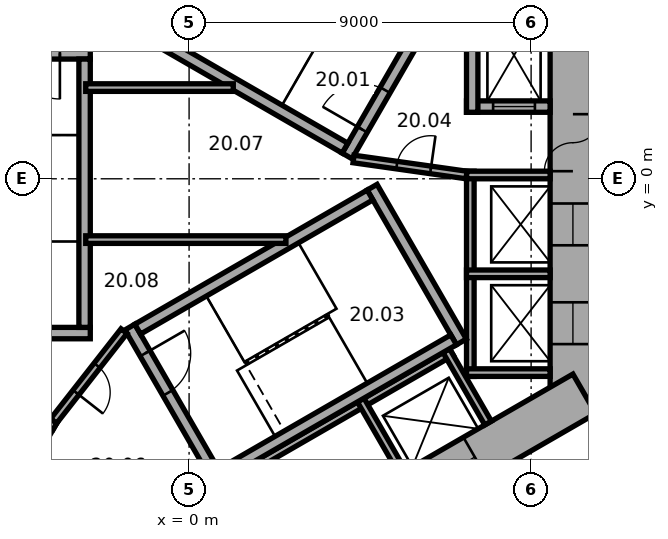
"""IFC4 building model, lengths in metres.
Left out: names, types, materials, properties, quantities, classifications, styles, units other than length and angle.
Written with IfcOpenShell. Run it as: python <this file> out.ifc"""

import sys

from ifc_helpers import new_model, si_unit, direction, frame, frame_2d, origin, place, context, subcontext, project, spatial, rectangle, extrude, element, fill, save


model = new_model("IFC4")
c1 = context("Model", 3, precision=1e-05, world=origin(), true_north=direction((0.0, 1.0)))
c2 = subcontext(c1, "Body", "Model", "MODEL_VIEW")
j1 = project(units=[si_unit("LENGTHUNIT", "METRE"), si_unit("PLANEANGLEUNIT", "RADIAN")], contexts=[c1])
p1 = place(None, origin())
s1 = spatial("IfcSite", under=j1, at=p1, CompositionType="ELEMENT")
p2 = place(p1, origin())
s2 = spatial("IfcBuilding", under=s1, at=p2, CompositionType="ELEMENT")
p3 = place(p2, frame((0.0, 0.0, 90.2)))
s3 = spatial("IfcBuildingStorey", under=s2, at=p3, CompositionType="ELEMENT", Elevation=90.2)
p4 = place(p3, frame((10.1, -6.177, 0.0), z_axis=(0.0, 0.0, 1.0), x_axis=(0.0, 1.0, 0.0)))
e1 = element("IfcWall", 1, at=p4, inside=s3, PredefinedType="SHEAR", context=c2, shape_type="SweptSolid", body=[
    extrude(rectangle(XDim=12.355, YDim=1.2, at=frame_2d((6.177, 0.0))), origin(), (0.0, 0.0, 1.0), 3.3),
])
p5 = place(p4, frame((6.378, 0.0, 0.0)))
e2 = element("IfcOpeningElement", 2, at=p5, cuts=e1, PredefinedType="OPENING", context=c2, shape_type="SweptSolid", body=[
    extrude(rectangle(XDim=1.5, YDim=2.1, at=frame_2d((0.75, 1.05))), frame((0.0, 0.61, 0.0), z_axis=(0.0, -1.0, 0.0), x_axis=(1.0, 0.0, 0.0)), (0.0, 0.0, 1.0), 1.22),
])
p6 = place(p4, frame((1.828, 0.0, 0.0)))
e3 = element("IfcOpeningElement", 3, at=p6, cuts=e1, PredefinedType="OPENING", context=c2, shape_type="SweptSolid", body=[
    extrude(rectangle(XDim=1.1, YDim=2.1, at=frame_2d((0.55, 1.05))), frame((0.0, 0.61, 0.0), z_axis=(0.0, -1.0, 0.0), x_axis=(1.0, 0.0, 0.0)), (0.0, 0.0, 1.0), 1.22),
])
p7 = place(p4, frame((4.427, 0.0, 0.0)))
e4 = element("IfcOpeningElement", 4, at=p7, cuts=e1, PredefinedType="OPENING", context=c2, shape_type="SweptSolid", body=[
    extrude(rectangle(XDim=1.1, YDim=2.1, at=frame_2d((0.55, 1.05))), frame((0.0, 0.61, 0.0), z_axis=(0.0, -1.0, 0.0), x_axis=(1.0, 0.0, 0.0)), (0.0, 0.0, 1.0), 1.22),
])
p8 = place(p3, frame((-10.4, -5.658, 0.0), z_axis=(0.0, 0.0, 1.0), x_axis=(0.866021384402, -0.500006961711, 0.0)))
e5 = element("IfcWall", 5, at=p8, inside=s3, PredefinedType="SHEAR", context=c2, shape_type="SweptSolid", body=[
    extrude(rectangle(XDim=12.355, YDim=1.2, at=frame_2d((6.178, 0.0))), origin(), (0.0, 0.0, 1.0), 3.3),
])
p9 = place(p8, frame((6.378, 0.0, 0.0)))
e6 = element("IfcOpeningElement", 6, at=p9, cuts=e5, PredefinedType="OPENING", context=c2, shape_type="SweptSolid", body=[
    extrude(rectangle(XDim=1.5, YDim=2.1, at=frame_2d((0.75, 1.05))), frame((0.0, 0.61, 0.0), z_axis=(0.0, -1.0, 0.0), x_axis=(1.0, 0.0, 0.0)), (0.0, 0.0, 1.0), 1.22),
])
p10 = place(p8, frame((3.228, 0.0, 0.0)))
e7 = element("IfcOpeningElement", 7, at=p10, cuts=e5, PredefinedType="OPENING", context=c2, shape_type="SweptSolid", body=[
    extrude(rectangle(XDim=0.9, YDim=2.1, at=frame_2d((0.45, 1.05))), frame((0.0, 0.61, 0.0), z_axis=(0.0, -1.0, 0.0), x_axis=(1.0, 0.0, 0.0)), (0.0, 0.0, 1.0), 1.22),
])
p11 = place(p3, frame((-0.3, -11.836, 0.0), z_axis=(0.0, 0.0, 1.0), x_axis=(0.866021384402, 0.500006961711, 0.0)))
e8 = element("IfcWall", 8, at=p11, inside=s3, PredefinedType="SHEAR", context=c2, shape_type="SweptSolid", body=[
    extrude(rectangle(XDim=12.355, YDim=1.2, at=frame_2d((6.178, 0.0))), origin(), (0.0, 0.0, 1.0), 3.3),
])
p12 = place(p11, frame((4.128, 0.0, 0.0)))
e9 = element("IfcOpeningElement", 9, at=p12, cuts=e8, PredefinedType="OPENING", context=c2, shape_type="SweptSolid", body=[
    extrude(rectangle(XDim=0.9, YDim=2.1, at=frame_2d((0.45, 1.05))), frame((0.0, 0.61, 0.0), z_axis=(0.0, -1.0, 0.0), x_axis=(1.0, 0.0, 0.0)), (0.0, 0.0, 1.0), 1.22),
])
p13 = place(p11, frame((7.928, 0.0, 0.0)))
e10 = element("IfcOpeningElement", 10, at=p13, cuts=e8, PredefinedType="OPENING", context=c2, shape_type="SweptSolid", body=[
    extrude(rectangle(XDim=1.1, YDim=2.1, at=frame_2d((0.55, 1.05))), frame((0.0, 0.61, 0.0), z_axis=(0.0, -1.0, 0.0), x_axis=(1.0, 0.0, 0.0)), (0.0, 0.0, 1.0), 1.22),
])
p14 = place(p3, frame((7.4, -5.2, 0.0), z_axis=(0.0, 0.0, 1.0), x_axis=(0.0, 1.0, 0.0)))
e11 = element("IfcWall", 11, at=p14, inside=s3, PredefinedType="PARTITIONING", context=c2, shape_type="SweptSolid", body=[
    extrude(rectangle(XDim=5.4, YDim=0.2, at=frame_2d((2.7, 0.0))), origin(), (0.0, 0.0, 1.0), 3.05),
])
for number, where, z_axis, x_axis in (
    (12, (7.3, -5.1, 0.0), (0.0, 0.0, 1.0), (1.0, 0.0, 0.0)),
    (13, (7.3, -2.5, 0.0), (0.0, 0.0, 1.0), (1.0, 0.0, 0.0)),
    (14, (7.3, 0.1, 0.0), (0.0, 0.0, 1.0), (1.0, 0.0, 0.0)),
):
    element("IfcWall", number, at=place(p3, frame(where, z_axis=z_axis, x_axis=x_axis)), inside=s3, PredefinedType="PARTITIONING", context=c2, shape_type="SweptSolid", body=[
        extrude(rectangle(XDim=2.2, YDim=0.2, at=frame_2d((1.1, 0.0))), origin(), (0.0, 0.0, 1.0), 3.05),
    ])
p15 = place(p3, frame((-8.203, -3.809, 0.0), z_axis=(0.0, 0.0, 1.0), x_axis=(0.866028230842, -0.499995103361, 0.0)))
e15 = element("IfcWall", 15, at=p15, inside=s3, PredefinedType="PARTITIONING", context=c2, shape_type="SweptSolid", body=[
    extrude(rectangle(XDim=5.4, YDim=0.2, at=frame_2d((2.7, 0.0))), origin(), (0.0, 0.0, 1.0), 3.05),
])
p16 = place(p3, frame((-3.563, -6.372, 0.0), z_axis=(0.0, 0.0, 1.0), x_axis=(-0.499994660107, -0.866028486751, 0.0)))
e16 = element("IfcWall", 16, at=p16, inside=s3, PredefinedType="PARTITIONING", context=c2, shape_type="SweptSolid", body=[
    extrude(rectangle(XDim=2.2, YDim=0.2, at=frame_2d((1.1, 0.0))), origin(), (0.0, 0.0, 1.0), 3.05),
])
p17 = place(p3, frame((-0.024, -8.559, 0.0), z_axis=(0.0, 0.0, 1.0), x_axis=(0.866026010844, 0.49999894854, 0.0)))
e17 = element("IfcWall", 17, at=p17, inside=s3, PredefinedType="PARTITIONING", context=c2, shape_type="SweptSolid", body=[
    extrude(rectangle(XDim=8.0, YDim=0.2, at=frame_2d((4.0, 0.0))), origin(), (0.0, 0.0, 1.0), 3.05),
])
for number, where, z_axis, x_axis in (
    (18, (4.516, -5.822, 0.0), (0.0, 0.0, 1.0), (0.5, -0.866, 0.0)),
    (19, (6.768, -4.522, 0.0), (0.0, 0.0, 1.0), (0.5, -0.866, 0.0)),
):
    element("IfcWall", number, at=place(p3, frame(where, z_axis=z_axis, x_axis=x_axis)), inside=s3, PredefinedType="PARTITIONING", context=c2, shape_type="SweptSolid", body=[
        extrude(rectangle(XDim=2.2, YDim=0.2, at=frame_2d((1.1, 0.0))), origin(), (0.0, 0.0, 1.0), 3.05),
    ])
p18 = place(p3, frame((4.158, 0.602, 0.0), z_axis=(0.0, 0.0, 1.0), x_axis=(0.499977259774, 0.866038532462, 0.0)))
e20 = element("IfcWall", 20, at=p18, inside=s3, PredefinedType="SHEAR", context=c2, shape_type="SweptSolid", body=[
    extrude(rectangle(XDim=4.7, YDim=0.3, at=frame_2d((2.35, 0.0))), origin(), (0.0, 0.0, 1.0), 3.05),
])
p19 = place(p18, frame((0.8, 0.0, 0.0)))
e21 = element("IfcOpeningElement", 21, at=p19, cuts=e20, PredefinedType="OPENING", context=c2, shape_type="SweptSolid", body=[
    extrude(rectangle(XDim=1.2, YDim=2.1, at=frame_2d((0.6, 1.05))), frame((0.0, 0.16, 0.0), z_axis=(0.0, -1.0, 0.0), x_axis=(1.0, 0.0, 0.0)), (0.0, 0.0, 1.0), 0.32),
])
p20 = place(p3, frame((4.103, 0.807, 0.0), z_axis=(0.0, 0.0, 1.0), x_axis=(-0.866027801685, 0.499995846692, 0.0)))
e22 = element("IfcWall", 22, at=p20, inside=s3, PredefinedType="SHEAR", context=c2, shape_type="SweptSolid", body=[
    extrude(rectangle(XDim=7.06, YDim=0.3, at=frame_2d((3.53, 0.0))), origin(), (0.0, 0.0, 1.0), 3.05),
])
p21 = place(p3, frame((-2.6, 3.3, 0.0), z_axis=(0.0, 0.0, 1.0), x_axis=(-1.0, 0.0, 0.0)))
e23 = element("IfcWall", 23, at=p21, inside=s3, PredefinedType="SHEAR", context=c2, shape_type="SweptSolid", body=[
    extrude(rectangle(XDim=4.7, YDim=0.3, at=frame_2d((2.35, 0.0))), origin(), (0.0, 0.0, 1.0), 3.05),
])
p22 = place(p21, frame((0.8, 0.0, 0.0)))
e24 = element("IfcOpeningElement", 24, at=p22, cuts=e23, PredefinedType="OPENING", context=c2, shape_type="SweptSolid", body=[
    extrude(rectangle(XDim=1.2, YDim=2.1, at=frame_2d((0.6, 1.05))), frame((0.0, 0.16, 0.0), z_axis=(0.0, -1.0, 0.0), x_axis=(1.0, 0.0, 0.0)), (0.0, 0.0, 1.0), 0.32),
])
p23 = place(p3, frame((-2.6, -4.06, 0.0), z_axis=(0.0, 0.0, 1.0), x_axis=(-1.0, 0.0, 0.0)))
e25 = element("IfcWall", 25, at=p23, inside=s3, PredefinedType="SHEAR", context=c2, shape_type="SweptSolid", body=[
    extrude(rectangle(XDim=4.7, YDim=0.3, at=frame_2d((2.35, 0.0))), origin(), (0.0, 0.0, 1.0), 3.05),
])
p24 = place(p3, frame((-2.75, 3.15, 0.0), z_axis=(0.0, 0.0, 1.0), x_axis=(0.0, -1.0, 0.0)))
e26 = element("IfcWall", 26, at=p24, inside=s3, PredefinedType="SHEAR", context=c2, shape_type="SweptSolid", body=[
    extrude(rectangle(XDim=7.06, YDim=0.3, at=frame_2d((3.53, 0.0))), origin(), (0.0, 0.0, 1.0), 3.05),
])
p25 = place(p3, frame((-1.558, -3.902, 0.0), z_axis=(0.0, 0.0, 1.0), x_axis=(0.499977259774, -0.866038532462, 0.0)))
e27 = element("IfcWall", 27, at=p25, inside=s3, PredefinedType="SHEAR", context=c2, shape_type="SweptSolid", body=[
    extrude(rectangle(XDim=4.7, YDim=0.3, at=frame_2d((2.35, 0.0))), origin(), (0.0, 0.0, 1.0), 3.05),
])
p26 = place(p25, frame((0.8, 0.0, 0.0)))
e28 = element("IfcOpeningElement", 28, at=p26, cuts=e27, PredefinedType="OPENING", context=c2, shape_type="SweptSolid", body=[
    extrude(rectangle(XDim=1.2, YDim=2.1, at=frame_2d((0.6, 1.05))), frame((0.0, 0.16, 0.0), z_axis=(0.0, -1.0, 0.0), x_axis=(1.0, 0.0, 0.0)), (0.0, 0.0, 1.0), 0.32),
])
p27 = place(p3, frame((4.816, -0.222, 0.0), z_axis=(0.0, 0.0, 1.0), x_axis=(0.499977259774, -0.866038532462, 0.0)))
e29 = element("IfcWall", 29, at=p27, inside=s3, PredefinedType="SHEAR", context=c2, shape_type="SweptSolid", body=[
    extrude(rectangle(XDim=4.7, YDim=0.3, at=frame_2d((2.35, 0.0))), origin(), (0.0, 0.0, 1.0), 3.05),
])
for number, where, z_axis, x_axis in (
    (30, (-1.353, -3.957, 0.0), (0.0, 0.0, 1.0), (0.866, 0.5, 0.0)),
    (31, (0.847, -7.767, 0.0), (0.0, 0.0, 1.0), (0.866, 0.5, 0.0)),
):
    element("IfcWall", number, at=place(p3, frame(where, z_axis=z_axis, x_axis=x_axis)), inside=s3, PredefinedType="SHEAR", context=c2, shape_type="SweptSolid", body=[
        extrude(rectangle(XDim=7.06, YDim=0.3, at=frame_2d((3.53, 0.0))), origin(), (0.0, 0.0, 1.0), 3.05),
    ])
p28 = place(p3, frame((7.3, 1.9, 0.0), z_axis=(0.0, 0.0, 1.0), x_axis=(1.0, 0.0, 0.0)))
e32 = element("IfcWall", 32, at=p28, inside=s3, PredefinedType="SHEAR", context=c2, shape_type="SweptSolid", body=[
    extrude(rectangle(XDim=2.2, YDim=0.3, at=frame_2d((1.1, 0.0))), origin(), (0.0, 0.0, 1.0), 3.05),
])
p29 = place(p28, frame((0.7, 0.0, 0.0)))
e33 = element("IfcOpeningElement", 33, at=p29, cuts=e32, PredefinedType="OPENING", context=c2, shape_type="SweptSolid", body=[
    extrude(rectangle(XDim=1.1, YDim=2.1, at=frame_2d((0.55, 1.05))), frame((0.0, 0.16, 0.0), z_axis=(0.0, -1.0, 0.0), x_axis=(1.0, 0.0, 0.0)), (0.0, 0.0, 1.0), 0.32),
])
p30 = place(p3, frame((7.45, 1.75, 0.0), z_axis=(0.0, 0.0, 1.0), x_axis=(0.0, 1.0, 0.0)))
e34 = element("IfcWall", 34, at=p30, inside=s3, PredefinedType="SHEAR", context=c2, shape_type="SweptSolid", body=[
    extrude(rectangle(XDim=3.35, YDim=0.3, at=frame_2d((1.675, 0.0))), origin(), (0.0, 0.0, 1.0), 3.05),
])
p31 = place(p3, frame((4.327, 0.521, 0.0), z_axis=(0.0, 0.0, 1.0), x_axis=(0.990124376366, -0.14019172346, 0.0)))
e35 = element("IfcWall", 35, at=p31, inside=s3, PredefinedType="PARTITIONING", context=c2, shape_type="SweptSolid", body=[
    extrude(rectangle(XDim=3.002, YDim=0.2, at=frame_2d((1.501, 0.0))), origin(), (0.0, 0.0, 1.0), 3.05),
])
p32 = place(p31, frame((1.15, 0.0, 0.0)))
e36 = element("IfcOpeningElement", 36, at=p32, cuts=e35, PredefinedType="OPENING", context=c2, shape_type="SweptSolid", body=[
    extrude(rectangle(XDim=0.9, YDim=2.1, at=frame_2d((0.45, 1.05))), frame((0.0, 0.11, 0.0), z_axis=(0.0, -1.0, 0.0), x_axis=(1.0, 0.0, 0.0)), (0.0, 0.0, 1.0), 0.22),
])
p33 = place(p3, frame((-1.712, -4.008, 0.0), z_axis=(0.0, 0.0, 1.0), x_axis=(-0.616549420702, -0.787316208287, 0.0)))
e37 = element("IfcWall", 37, at=p33, inside=s3, PredefinedType="PARTITIONING", context=c2, shape_type="SweptSolid", body=[
    extrude(rectangle(XDim=3.002, YDim=0.2, at=frame_2d((1.501, 0.0))), origin(), (0.0, 0.0, 1.0), 3.05),
])
p34 = place(p33, frame((1.15, 0.0, 0.0)))
e38 = element("IfcOpeningElement", 38, at=p34, cuts=e37, PredefinedType="OPENING", context=c2, shape_type="SweptSolid", body=[
    extrude(rectangle(XDim=0.9, YDim=2.1, at=frame_2d((0.45, 1.05))), frame((0.0, 0.11, 0.0), z_axis=(0.0, -1.0, 0.0), x_axis=(1.0, 0.0, 0.0)), (0.0, 0.0, 1.0), 0.22),
])
p35 = place(p3, frame((-2.72, -1.6, 0.0), z_axis=(0.0, 0.0, 1.0), x_axis=(1.0, 0.0, 0.0)))
e39 = element("IfcWall", 39, at=p35, inside=s3, PredefinedType="PARTITIONING", context=c2, shape_type="SweptSolid", body=[
    extrude(rectangle(XDim=5.269, YDim=0.2, at=frame_2d((2.634, 0.0))), origin(), (0.0, 0.0, 1.0), 3.05),
])
p36 = place(p3, frame((-2.72, 2.4, 0.0), z_axis=(0.0, 0.0, 1.0), x_axis=(1.0, 0.0, 0.0)))
e40 = element("IfcWall", 40, at=p36, inside=s3, PredefinedType="PARTITIONING", context=c2, shape_type="SweptSolid", body=[
    extrude(rectangle(XDim=3.883, YDim=0.2, at=frame_2d((1.941, 0.0))), origin(), (0.0, 0.0, 1.0), 3.05),
])
p37 = place(p5, origin())
e41 = element("IfcDoor", 41, at=p37, inside=s3, OperationType="DOUBLE_DOOR_SINGLE_SWING", PredefinedType="DOOR", context=c2, shape_type="SweptSolid", body=[
    extrude(rectangle(XDim=1.5, YDim=2.1, at=frame_2d((0.75, 1.05))), frame((0.0, 0.025, 0.0), z_axis=(0.0, -1.0, 0.0), x_axis=(1.0, 0.0, 0.0)), (0.0, 0.0, 1.0), 0.05),
])
fill(e2, e41)
p38 = place(p19, origin())
e42 = element("IfcDoor", 42, at=p38, inside=s3, OperationType="SINGLE_SWING_RIGHT", PredefinedType="DOOR", context=c2, shape_type="SweptSolid", body=[
    extrude(rectangle(XDim=1.2, YDim=2.1, at=frame_2d((0.6, 1.05))), frame((0.0, 0.025, 0.0), z_axis=(0.0, -1.0, 0.0), x_axis=(1.0, 0.0, 0.0)), (0.0, 0.0, 1.0), 0.05),
])
fill(e21, e42)
p39 = place(p22, origin())
e43 = element("IfcDoor", 43, at=p39, inside=s3, OperationType="SINGLE_SWING_RIGHT", PredefinedType="DOOR", context=c2, shape_type="SweptSolid", body=[
    extrude(rectangle(XDim=1.2, YDim=2.1, at=frame_2d((0.6, 1.05))), frame((0.0, 0.025, 0.0), z_axis=(0.0, -1.0, 0.0), x_axis=(1.0, 0.0, 0.0)), (0.0, 0.0, 1.0), 0.05),
])
fill(e24, e43)
p40 = place(p26, origin())
e44 = element("IfcDoor", 44, at=p40, inside=s3, OperationType="SINGLE_SWING_RIGHT", PredefinedType="DOOR", context=c2, shape_type="SweptSolid", body=[
    extrude(rectangle(XDim=1.2, YDim=2.1, at=frame_2d((0.6, 1.05))), frame((0.0, 0.025, 0.0), z_axis=(0.0, -1.0, 0.0), x_axis=(1.0, 0.0, 0.0)), (0.0, 0.0, 1.0), 0.05),
])
fill(e28, e44)
p41 = place(p32, origin())
e45 = element("IfcDoor", 45, at=p41, inside=s3, OperationType="SINGLE_SWING_LEFT", PredefinedType="DOOR", context=c2, shape_type="SweptSolid", body=[
    extrude(rectangle(XDim=0.9, YDim=2.1, at=frame_2d((0.45, 1.05))), frame((0.0, 0.025, 0.0), z_axis=(0.0, -1.0, 0.0), x_axis=(1.0, 0.0, 0.0)), (0.0, 0.0, 1.0), 0.05),
])
fill(e36, e45)
p42 = place(p34, origin())
e46 = element("IfcDoor", 46, at=p42, inside=s3, OperationType="SINGLE_SWING_LEFT", PredefinedType="DOOR", context=c2, shape_type="SweptSolid", body=[
    extrude(rectangle(XDim=0.9, YDim=2.1, at=frame_2d((0.45, 1.05))), frame((0.0, 0.025, 0.0), z_axis=(0.0, -1.0, 0.0), x_axis=(1.0, 0.0, 0.0)), (0.0, 0.0, 1.0), 0.05),
])
fill(e38, e46)
p43 = place(p29, origin())
e47 = element("IfcDoor", 47, at=p43, inside=s3, OperationType="DOUBLE_DOOR_SLIDING", PredefinedType="DOOR", context=c2, shape_type="SweptSolid", body=[
    extrude(rectangle(XDim=1.1, YDim=2.1, at=frame_2d((0.55, 1.05))), frame((0.0, 0.025, 0.0), z_axis=(0.0, -1.0, 0.0), x_axis=(1.0, 0.0, 0.0)), (0.0, 0.0, 1.0), 0.05),
])
fill(e33, e47)
p44 = place(p6, origin())
e48 = element("IfcDoor", 48, at=p44, inside=s3, OperationType="DOUBLE_DOOR_SLIDING", PredefinedType="DOOR", context=c2, shape_type="SweptSolid", body=[
    extrude(rectangle(XDim=1.1, YDim=2.1, at=frame_2d((0.55, 1.05))), frame((0.0, 0.025, 0.0), z_axis=(0.0, -1.0, 0.0), x_axis=(1.0, 0.0, 0.0)), (0.0, 0.0, 1.0), 0.05),
])
fill(e3, e48)
p45 = place(p7, origin())
e49 = element("IfcDoor", 49, at=p45, inside=s3, OperationType="DOUBLE_DOOR_SLIDING", PredefinedType="DOOR", context=c2, shape_type="SweptSolid", body=[
    extrude(rectangle(XDim=1.1, YDim=2.1, at=frame_2d((0.55, 1.05))), frame((0.0, 0.025, 0.0), z_axis=(0.0, -1.0, 0.0), x_axis=(1.0, 0.0, 0.0)), (0.0, 0.0, 1.0), 0.05),
])
fill(e4, e49)
p46 = place(p13, origin())
e50 = element("IfcDoor", 50, at=p46, inside=s3, OperationType="DOUBLE_DOOR_SLIDING", PredefinedType="DOOR", context=c2, shape_type="SweptSolid", body=[
    extrude(rectangle(XDim=1.1, YDim=2.1, at=frame_2d((0.55, 1.05))), frame((0.0, 0.025, 0.0), z_axis=(0.0, -1.0, 0.0), x_axis=(1.0, 0.0, 0.0)), (0.0, 0.0, 1.0), 0.05),
])
fill(e10, e50)
save(model, sys.argv[1])
